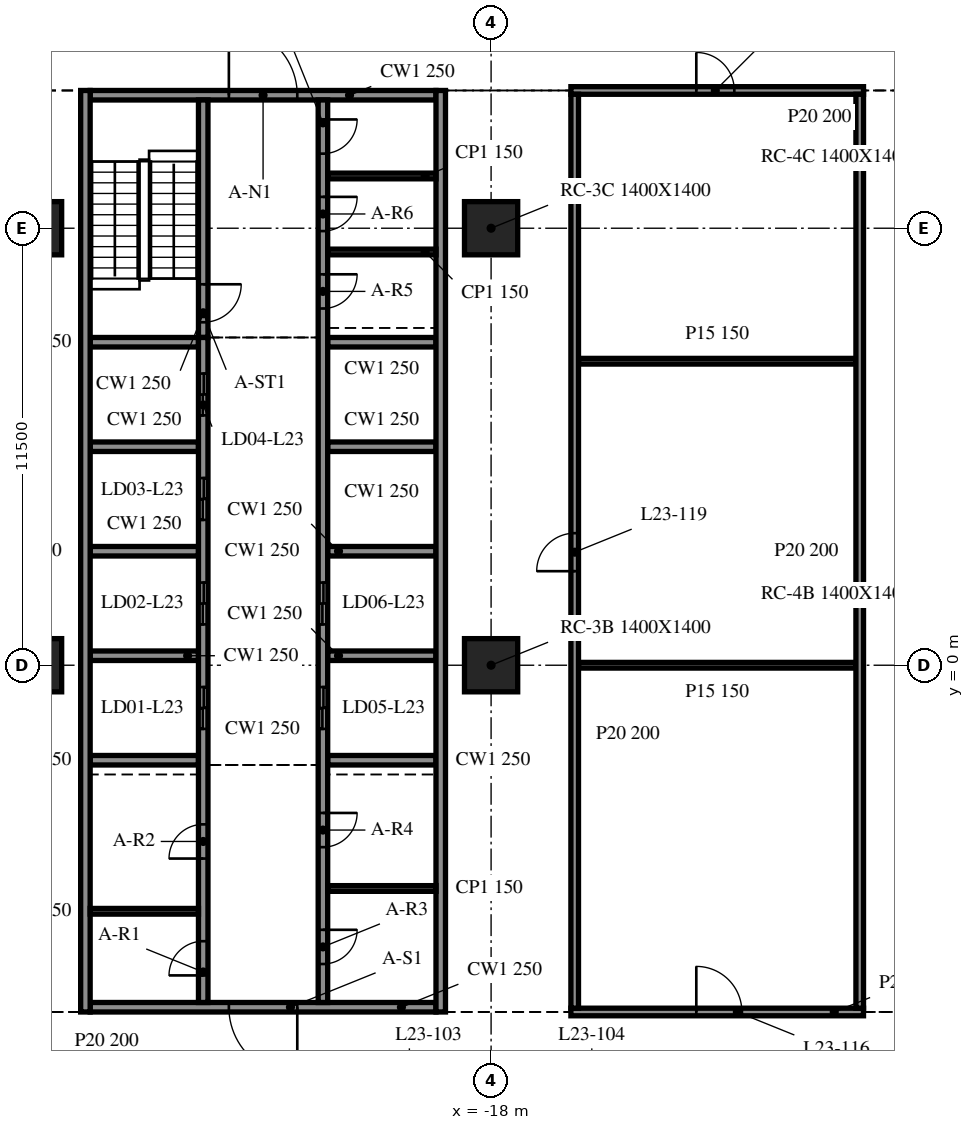
"""IFC4 building model, lengths in metres.
Left out: names, types, materials, properties, quantities, classifications, styles, units other than length and angle.
Written with IfcOpenShell. Run it as: python <this file> out.ifc"""

import sys

from ifc_helpers import new_model, si_unit, direction, frame, frame_2d, origin, origin_2d, place, context, subcontext, project, spatial, rectangle, extrude, element, fill, save


model = new_model("IFC4")
c1 = context("Model", 3, precision=1e-05, world=origin(), true_north=direction((0.0, 1.0)))
c2 = subcontext(c1, "Body", "Model", "MODEL_VIEW")
j1 = project(units=[si_unit("LENGTHUNIT", "METRE"), si_unit("PLANEANGLEUNIT", "RADIAN")], contexts=[c1])
p1 = place(None, origin())
s1 = spatial("IfcSite", under=j1, at=p1, CompositionType="ELEMENT")
p2 = place(p1, origin())
s2 = spatial("IfcBuilding", under=s1, at=p2, CompositionType="ELEMENT")
p3 = place(p2, frame((0.0, 0.0, 101.2)))
s3 = spatial("IfcBuildingStorey", under=s2, at=p3, CompositionType="ELEMENT", Elevation=101.2)
for number, where, z_axis, x_axis in (
    (1, (-30.0, 0.0, -0.34), (0.0, 0.0, 1.0), (1.0, 0.0, 0.0)),
    (2, (-30.0, 11.5, -0.34), (0.0, 0.0, 1.0), (1.0, 0.0, 0.0)),
    (3, (-18.0, 0.0, -0.34), (0.0, 0.0, 1.0), (1.0, 0.0, 0.0)),
    (4, (-18.0, 11.5, -0.34), (0.0, 0.0, 1.0), (1.0, 0.0, 0.0)),
):
    element("IfcColumn", number, at=place(p3, frame(where, z_axis=z_axis, x_axis=x_axis)), inside=s3, PredefinedType="COLUMN", context=c2, shape_type="SweptSolid", body=[
        extrude(rectangle(XDim=1.4, YDim=1.4, at=origin_2d()), origin(), (0.0, 0.0, 1.0), 4.1),
    ])
for number, where, z_axis, x_axis in (
    (5, (-28.675, 15.125, 0.0), (0.0, 0.0, 1.0), (0.0, -1.0, 0.0)),
    (6, (-19.325, -9.125, 0.0), (0.0, 0.0, 1.0), (0.0, 1.0, 0.0)),
):
    element("IfcWall", number, at=place(p3, frame(where, z_axis=z_axis, x_axis=x_axis)), inside=s3, PredefinedType="SOLIDWALL", context=c2, shape_type="SweptSolid", body=[
        extrude(rectangle(XDim=24.25, YDim=0.25, at=frame_2d((12.125, 0.0))), origin(), (0.0, 0.0, 1.0), 3.76),
    ])
p4 = place(p3, frame((-19.45, -9.0, 0.0), z_axis=(0.0, 0.0, 1.0), x_axis=(-1.0, 0.0, 0.0)))
e7 = element("IfcWall", 7, at=p4, inside=s3, PredefinedType="SOLIDWALL", context=c2, shape_type="SweptSolid", body=[
    extrude(rectangle(XDim=9.1, YDim=0.25, at=frame_2d((4.55, 0.0))), origin(), (0.0, 0.0, 1.0), 3.76),
])
p5 = place(p4, frame((3.65, 0.0, 0.0)))
e8 = element("IfcOpeningElement", 8, at=p5, cuts=e7, PredefinedType="OPENING", context=c2, shape_type="SweptSolid", body=[
    extrude(rectangle(XDim=1.8, YDim=2.1, at=frame_2d((0.9, 1.05))), frame((0.0, 0.135, 0.0), z_axis=(0.0, -1.0, 0.0), x_axis=(1.0, 0.0, 0.0)), (0.0, 0.0, 1.0), 0.27),
])
p6 = place(p3, frame((-28.55, 15.0, 0.0), z_axis=(0.0, 0.0, 1.0), x_axis=(1.0, 0.0, 0.0)))
e9 = element("IfcWall", 9, at=p6, inside=s3, PredefinedType="SOLIDWALL", context=c2, shape_type="SweptSolid", body=[
    extrude(rectangle(XDim=9.1, YDim=0.25, at=frame_2d((4.55, 0.0))), origin(), (0.0, 0.0, 1.0), 3.76),
])
p7 = place(p6, frame((3.65, 0.0, 0.0)))
e10 = element("IfcOpeningElement", 10, at=p7, cuts=e9, PredefinedType="OPENING", context=c2, shape_type="SweptSolid", body=[
    extrude(rectangle(XDim=1.8, YDim=2.1, at=frame_2d((0.9, 1.05))), frame((0.0, 0.135, 0.0), z_axis=(0.0, -1.0, 0.0), x_axis=(1.0, 0.0, 0.0)), (0.0, 0.0, 1.0), 0.27),
])
p8 = place(p3, frame((-25.575, -8.875, 0.0), z_axis=(0.0, 0.0, 1.0), x_axis=(0.0, 1.0, 0.0)))
e11 = element("IfcWall", 11, at=p8, inside=s3, PredefinedType="SOLIDWALL", context=c2, shape_type="SweptSolid", body=[
    extrude(rectangle(XDim=17.5, YDim=0.25, at=frame_2d((8.75, 0.0))), origin(), (0.0, 0.0, 1.0), 3.76),
])
p9 = place(p8, frame((7.2, 0.0, 0.0)))
e12 = element("IfcOpeningElement", 12, at=p9, cuts=e11, PredefinedType="OPENING", context=c2, shape_type="SweptSolid", body=[
    extrude(rectangle(XDim=1.1, YDim=2.1, at=frame_2d((0.55, 1.05))), frame((0.0, 0.135, 0.0), z_axis=(0.0, -1.0, 0.0), x_axis=(1.0, 0.0, 0.0)), (0.0, 0.0, 1.0), 0.27),
])
p10 = place(p8, frame((9.95, 0.0, 0.0)))
e13 = element("IfcOpeningElement", 13, at=p10, cuts=e11, PredefinedType="OPENING", context=c2, shape_type="SweptSolid", body=[
    extrude(rectangle(XDim=1.1, YDim=2.1, at=frame_2d((0.55, 1.05))), frame((0.0, 0.135, 0.0), z_axis=(0.0, -1.0, 0.0), x_axis=(1.0, 0.0, 0.0)), (0.0, 0.0, 1.0), 0.27),
])
p11 = place(p8, frame((12.7, 0.0, 0.0)))
e14 = element("IfcOpeningElement", 14, at=p11, cuts=e11, PredefinedType="OPENING", context=c2, shape_type="SweptSolid", body=[
    extrude(rectangle(XDim=1.1, YDim=2.1, at=frame_2d((0.55, 1.05))), frame((0.0, 0.135, 0.0), z_axis=(0.0, -1.0, 0.0), x_axis=(1.0, 0.0, 0.0)), (0.0, 0.0, 1.0), 0.27),
])
p12 = place(p8, frame((15.45, 0.0, 0.0)))
e15 = element("IfcOpeningElement", 15, at=p12, cuts=e11, PredefinedType="OPENING", context=c2, shape_type="SweptSolid", body=[
    extrude(rectangle(XDim=1.1, YDim=2.1, at=frame_2d((0.55, 1.05))), frame((0.0, 0.135, 0.0), z_axis=(0.0, -1.0, 0.0), x_axis=(1.0, 0.0, 0.0)), (0.0, 0.0, 1.0), 0.27),
])
p13 = place(p8, frame((0.712, 0.0, 0.0)))
e16 = element("IfcOpeningElement", 16, at=p13, cuts=e11, PredefinedType="OPENING", context=c2, shape_type="SweptSolid", body=[
    extrude(rectangle(XDim=0.9, YDim=2.1, at=frame_2d((0.45, 1.05))), frame((0.0, 0.135, 0.0), z_axis=(0.0, -1.0, 0.0), x_axis=(1.0, 0.0, 0.0)), (0.0, 0.0, 1.0), 0.27),
])
p14 = place(p8, frame((3.788, 0.0, 0.0)))
e17 = element("IfcOpeningElement", 17, at=p14, cuts=e11, PredefinedType="OPENING", context=c2, shape_type="SweptSolid", body=[
    extrude(rectangle(XDim=0.9, YDim=2.1, at=frame_2d((0.45, 1.05))), frame((0.0, 0.135, 0.0), z_axis=(0.0, -1.0, 0.0), x_axis=(1.0, 0.0, 0.0)), (0.0, 0.0, 1.0), 0.27),
])
p15 = place(p3, frame((-25.575, 14.875, 0.0), z_axis=(0.0, 0.0, 1.0), x_axis=(0.0, -1.0, 0.0)))
e18 = element("IfcWall", 18, at=p15, inside=s3, PredefinedType="SOLIDWALL", context=c2, shape_type="SweptSolid", body=[
    extrude(rectangle(XDim=6.25, YDim=0.25, at=frame_2d((3.125, 0.0))), origin(), (0.0, 0.0, 1.0), 3.76),
])
p16 = place(p15, frame((4.85, 0.0, 0.0)))
e19 = element("IfcOpeningElement", 19, at=p16, cuts=e18, PredefinedType="OPENING", context=c2, shape_type="SweptSolid", body=[
    extrude(rectangle(XDim=1.0, YDim=2.1, at=frame_2d((0.5, 1.05))), frame((0.0, 0.135, 0.0), z_axis=(0.0, -1.0, 0.0), x_axis=(1.0, 0.0, 0.0)), (0.0, 0.0, 1.0), 0.27),
])
p17 = place(p3, frame((-22.425, 14.875, 0.0), z_axis=(0.0, 0.0, 1.0), x_axis=(0.0, -1.0, 0.0)))
e20 = element("IfcWall", 20, at=p17, inside=s3, PredefinedType="SOLIDWALL", context=c2, shape_type="SweptSolid", body=[
    extrude(rectangle(XDim=23.75, YDim=0.25, at=frame_2d((11.875, 0.0))), origin(), (0.0, 0.0, 1.0), 3.76),
])
p18 = place(p17, frame((15.45, 0.0, 0.0)))
e21 = element("IfcOpeningElement", 21, at=p18, cuts=e20, PredefinedType="OPENING", context=c2, shape_type="SweptSolid", body=[
    extrude(rectangle(XDim=1.1, YDim=2.1, at=frame_2d((0.55, 1.05))), frame((0.0, 0.135, 0.0), z_axis=(0.0, -1.0, 0.0), x_axis=(1.0, 0.0, 0.0)), (0.0, 0.0, 1.0), 0.27),
])
p19 = place(p17, frame((12.7, 0.0, 0.0)))
e22 = element("IfcOpeningElement", 22, at=p19, cuts=e20, PredefinedType="OPENING", context=c2, shape_type="SweptSolid", body=[
    extrude(rectangle(XDim=1.1, YDim=2.1, at=frame_2d((0.55, 1.05))), frame((0.0, 0.135, 0.0), z_axis=(0.0, -1.0, 0.0), x_axis=(1.0, 0.0, 0.0)), (0.0, 0.0, 1.0), 0.27),
])
p20 = place(p17, frame((21.837, 0.0, 0.0)))
e23 = element("IfcOpeningElement", 23, at=p20, cuts=e20, PredefinedType="OPENING", context=c2, shape_type="SweptSolid", body=[
    extrude(rectangle(XDim=0.9, YDim=2.1, at=frame_2d((0.45, 1.05))), frame((0.0, 0.135, 0.0), z_axis=(0.0, -1.0, 0.0), x_axis=(1.0, 0.0, 0.0)), (0.0, 0.0, 1.0), 0.27),
])
p21 = place(p17, frame((18.762, 0.0, 0.0)))
e24 = element("IfcOpeningElement", 24, at=p21, cuts=e20, PredefinedType="OPENING", context=c2, shape_type="SweptSolid", body=[
    extrude(rectangle(XDim=0.9, YDim=2.1, at=frame_2d((0.45, 1.05))), frame((0.0, 0.135, 0.0), z_axis=(0.0, -1.0, 0.0), x_axis=(1.0, 0.0, 0.0)), (0.0, 0.0, 1.0), 0.27),
])
p22 = place(p17, frame((4.587, 0.0, 0.0)))
e25 = element("IfcOpeningElement", 25, at=p22, cuts=e20, PredefinedType="OPENING", context=c2, shape_type="SweptSolid", body=[
    extrude(rectangle(XDim=0.9, YDim=2.1, at=frame_2d((0.45, 1.05))), frame((0.0, 0.135, 0.0), z_axis=(0.0, -1.0, 0.0), x_axis=(1.0, 0.0, 0.0)), (0.0, 0.0, 1.0), 0.27),
])
p23 = place(p17, frame((2.55, 0.0, 0.0)))
e26 = element("IfcOpeningElement", 26, at=p23, cuts=e20, PredefinedType="OPENING", context=c2, shape_type="SweptSolid", body=[
    extrude(rectangle(XDim=0.9, YDim=2.1, at=frame_2d((0.45, 1.05))), frame((0.0, 0.135, 0.0), z_axis=(0.0, -1.0, 0.0), x_axis=(1.0, 0.0, 0.0)), (0.0, 0.0, 1.0), 0.27),
])
p24 = place(p17, frame((0.512, 0.0, 0.0)))
e27 = element("IfcOpeningElement", 27, at=p24, cuts=e20, PredefinedType="OPENING", context=c2, shape_type="SweptSolid", body=[
    extrude(rectangle(XDim=0.9, YDim=2.1, at=frame_2d((0.45, 1.05))), frame((0.0, 0.135, 0.0), z_axis=(0.0, -1.0, 0.0), x_axis=(1.0, 0.0, 0.0)), (0.0, 0.0, 1.0), 0.27),
])
for number, where, z_axis, x_axis in (
    (28, (-28.55, -2.5, 0.0), (0.0, 0.0, 1.0), (1.0, 0.0, 0.0)),
    (29, (-28.55, 0.25, 0.0), (0.0, 0.0, 1.0), (1.0, 0.0, 0.0)),
    (30, (-28.55, 3.0, 0.0), (0.0, 0.0, 1.0), (1.0, 0.0, 0.0)),
    (31, (-28.55, 5.75, 0.0), (0.0, 0.0, 1.0), (1.0, 0.0, 0.0)),
    (32, (-28.55, 8.5, 0.0), (0.0, 0.0, 1.0), (1.0, 0.0, 0.0)),
    (33, (-22.3, -2.5, 0.0), (0.0, 0.0, 1.0), (1.0, 0.0, 0.0)),
    (34, (-22.3, 0.25, 0.0), (0.0, 0.0, 1.0), (1.0, 0.0, 0.0)),
    (35, (-22.3, 3.0, 0.0), (0.0, 0.0, 1.0), (1.0, 0.0, 0.0)),
    (36, (-22.3, 5.75, 0.0), (0.0, 0.0, 1.0), (1.0, 0.0, 0.0)),
    (37, (-22.3, 8.5, 0.0), (0.0, 0.0, 1.0), (1.0, 0.0, 0.0)),
):
    element("IfcWall", number, at=place(p3, frame(where, z_axis=z_axis, x_axis=x_axis)), inside=s3, PredefinedType="SOLIDWALL", context=c2, shape_type="SweptSolid", body=[
        extrude(rectangle(XDim=2.85, YDim=0.25, at=frame_2d((1.425, 0.0))), origin(), (0.0, 0.0, 1.0), 3.76),
    ])
for number, where, z_axis, x_axis in (
    (38, (-28.55, -6.475, 0.0), (0.0, 0.0, 1.0), (1.0, 0.0, 0.0)),
    (39, (-22.3, -5.875, 0.0), (0.0, 0.0, 1.0), (1.0, 0.0, 0.0)),
    (40, (-22.3, 10.875, 0.0), (0.0, 0.0, 1.0), (1.0, 0.0, 0.0)),
    (41, (-22.3, 12.875, 0.0), (0.0, 0.0, 1.0), (1.0, 0.0, 0.0)),
):
    element("IfcWall", number, at=place(p3, frame(where, z_axis=z_axis, x_axis=x_axis)), inside=s3, PredefinedType="PARTITIONING", context=c2, shape_type="SweptSolid", body=[
        extrude(rectangle(XDim=2.85, YDim=0.15, at=frame_2d((1.425, 0.0))), origin(), (0.0, 0.0, 1.0), 3.76),
    ])
p25 = place(p3, frame((-15.9, -9.125, 0.0), z_axis=(0.0, 0.0, 1.0), x_axis=(1.0, 0.0, 0.0)))
e42 = element("IfcWall", 42, at=p25, inside=s3, PredefinedType="PARTITIONING", context=c2, shape_type="SweptSolid", body=[
    extrude(rectangle(XDim=7.7, YDim=0.2, at=frame_2d((3.85, 0.0))), origin(), (0.0, 0.0, 1.0), 3.76),
])
p26 = place(p25, frame((3.3, 0.0, 0.0)))
e43 = element("IfcOpeningElement", 43, at=p26, cuts=e42, PredefinedType="OPENING", context=c2, shape_type="SweptSolid", body=[
    extrude(rectangle(XDim=1.2, YDim=2.1, at=frame_2d((0.6, 1.05))), frame((0.0, 0.11, 0.0), z_axis=(0.0, -1.0, 0.0), x_axis=(1.0, 0.0, 0.0)), (0.0, 0.0, 1.0), 0.22),
])
for number, where, z_axis, x_axis in (
    (44, (-15.7, 0.0, 0.0), (0.0, 0.0, 1.0), (1.0, 0.0, 0.0)),
    (45, (-15.7, 8.0, 0.0), (0.0, 0.0, 1.0), (1.0, 0.0, 0.0)),
):
    element("IfcWall", number, at=place(p3, frame(where, z_axis=z_axis, x_axis=x_axis)), inside=s3, PredefinedType="PARTITIONING", context=c2, shape_type="SweptSolid", body=[
        extrude(rectangle(XDim=7.3, YDim=0.15, at=frame_2d((3.65, 0.0))), origin(), (0.0, 0.0, 1.0), 3.76),
    ])
p27 = place(p3, frame((-15.9, 15.125, 0.0), z_axis=(0.0, 0.0, 1.0), x_axis=(1.0, 0.0, 0.0)))
e46 = element("IfcWall", 46, at=p27, inside=s3, PredefinedType="PARTITIONING", context=c2, shape_type="SweptSolid", body=[
    extrude(rectangle(XDim=7.7, YDim=0.2, at=frame_2d((3.85, 0.0))), origin(), (0.0, 0.0, 1.0), 3.76),
])
p28 = place(p27, frame((3.3, 0.0, 0.0)))
e47 = element("IfcOpeningElement", 47, at=p28, cuts=e46, PredefinedType="OPENING", context=c2, shape_type="SweptSolid", body=[
    extrude(rectangle(XDim=1.0, YDim=2.1, at=frame_2d((0.5, 1.05))), frame((0.0, 0.11, 0.0), z_axis=(0.0, -1.0, 0.0), x_axis=(1.0, 0.0, 0.0)), (0.0, 0.0, 1.0), 0.22),
])
p29 = place(p3, frame((-15.8, -9.025, 0.0), z_axis=(0.0, 0.0, 1.0), x_axis=(0.0, 1.0, 0.0)))
e48 = element("IfcWall", 48, at=p29, inside=s3, PredefinedType="PARTITIONING", context=c2, shape_type="SweptSolid", body=[
    extrude(rectangle(XDim=24.05, YDim=0.2, at=frame_2d((12.025, 0.0))), origin(), (0.0, 0.0, 1.0), 3.76),
])
p30 = place(p29, frame((11.5, 0.0, 0.0)))
e49 = element("IfcOpeningElement", 49, at=p30, cuts=e48, PredefinedType="OPENING", context=c2, shape_type="SweptSolid", body=[
    extrude(rectangle(XDim=1.0, YDim=2.1, at=frame_2d((0.5, 1.05))), frame((0.0, 0.11, 0.0), z_axis=(0.0, -1.0, 0.0), x_axis=(1.0, 0.0, 0.0)), (0.0, 0.0, 1.0), 0.22),
])
p31 = place(p3, frame((-8.3, -9.025, 0.0), z_axis=(0.0, 0.0, 1.0), x_axis=(0.0, 1.0, 0.0)))
e50 = element("IfcWall", 50, at=p31, inside=s3, PredefinedType="PARTITIONING", context=c2, shape_type="SweptSolid", body=[
    extrude(rectangle(XDim=24.05, YDim=0.2, at=frame_2d((12.025, 0.0))), origin(), (0.0, 0.0, 1.0), 3.76),
])
p32 = place(p5, origin())
e51 = element("IfcDoor", 51, at=p32, inside=s3, OperationType="DOUBLE_DOOR_SINGLE_SWING", PredefinedType="DOOR", context=c2, shape_type="SweptSolid", body=[
    extrude(rectangle(XDim=1.8, YDim=2.1, at=frame_2d((0.9, 1.05))), frame((0.0, 0.025, 0.0), z_axis=(0.0, -1.0, 0.0), x_axis=(1.0, 0.0, 0.0)), (0.0, 0.0, 1.0), 0.05),
])
fill(e8, e51)
p33 = place(p7, origin())
e52 = element("IfcDoor", 52, at=p33, inside=s3, OperationType="DOUBLE_DOOR_SINGLE_SWING", PredefinedType="DOOR", context=c2, shape_type="SweptSolid", body=[
    extrude(rectangle(XDim=1.8, YDim=2.1, at=frame_2d((0.9, 1.05))), frame((0.0, 0.025, 0.0), z_axis=(0.0, -1.0, 0.0), x_axis=(1.0, 0.0, 0.0)), (0.0, 0.0, 1.0), 0.05),
])
fill(e10, e52)
p34 = place(p18, origin())
e53 = element("IfcDoor", 53, at=p34, inside=s3, OperationType="DOUBLE_DOOR_SLIDING", PredefinedType="DOOR", context=c2, shape_type="SweptSolid", body=[
    extrude(rectangle(XDim=1.1, YDim=2.1, at=frame_2d((0.55, 1.05))), frame((0.0, 0.025, 0.0), z_axis=(0.0, -1.0, 0.0), x_axis=(1.0, 0.0, 0.0)), (0.0, 0.0, 1.0), 0.05),
])
fill(e21, e53)
p35 = place(p19, origin())
e54 = element("IfcDoor", 54, at=p35, inside=s3, OperationType="DOUBLE_DOOR_SLIDING", PredefinedType="DOOR", context=c2, shape_type="SweptSolid", body=[
    extrude(rectangle(XDim=1.1, YDim=2.1, at=frame_2d((0.55, 1.05))), frame((0.0, 0.025, 0.0), z_axis=(0.0, -1.0, 0.0), x_axis=(1.0, 0.0, 0.0)), (0.0, 0.0, 1.0), 0.05),
])
fill(e22, e54)
p36 = place(p9, origin())
e55 = element("IfcDoor", 55, at=p36, inside=s3, OperationType="DOUBLE_DOOR_SLIDING", PredefinedType="DOOR", context=c2, shape_type="SweptSolid", body=[
    extrude(rectangle(XDim=1.1, YDim=2.1, at=frame_2d((0.55, 1.05))), frame((0.0, 0.025, 0.0), z_axis=(0.0, -1.0, 0.0), x_axis=(1.0, 0.0, 0.0)), (0.0, 0.0, 1.0), 0.05),
])
fill(e12, e55)
p37 = place(p10, origin())
e56 = element("IfcDoor", 56, at=p37, inside=s3, OperationType="DOUBLE_DOOR_SLIDING", PredefinedType="DOOR", context=c2, shape_type="SweptSolid", body=[
    extrude(rectangle(XDim=1.1, YDim=2.1, at=frame_2d((0.55, 1.05))), frame((0.0, 0.025, 0.0), z_axis=(0.0, -1.0, 0.0), x_axis=(1.0, 0.0, 0.0)), (0.0, 0.0, 1.0), 0.05),
])
fill(e13, e56)
p38 = place(p11, origin())
e57 = element("IfcDoor", 57, at=p38, inside=s3, OperationType="DOUBLE_DOOR_SLIDING", PredefinedType="DOOR", context=c2, shape_type="SweptSolid", body=[
    extrude(rectangle(XDim=1.1, YDim=2.1, at=frame_2d((0.55, 1.05))), frame((0.0, 0.025, 0.0), z_axis=(0.0, -1.0, 0.0), x_axis=(1.0, 0.0, 0.0)), (0.0, 0.0, 1.0), 0.05),
])
fill(e14, e57)
p39 = place(p12, origin())
e58 = element("IfcDoor", 58, at=p39, inside=s3, OperationType="DOUBLE_DOOR_SLIDING", PredefinedType="DOOR", context=c2, shape_type="SweptSolid", body=[
    extrude(rectangle(XDim=1.1, YDim=2.1, at=frame_2d((0.55, 1.05))), frame((0.0, 0.025, 0.0), z_axis=(0.0, -1.0, 0.0), x_axis=(1.0, 0.0, 0.0)), (0.0, 0.0, 1.0), 0.05),
])
fill(e15, e58)
p40 = place(p13, origin())
e59 = element("IfcDoor", 59, at=p40, inside=s3, OperationType="SINGLE_SWING_LEFT", PredefinedType="DOOR", context=c2, shape_type="SweptSolid", body=[
    extrude(rectangle(XDim=0.9, YDim=2.1, at=frame_2d((0.45, 1.05))), frame((0.0, 0.025, 0.0), z_axis=(0.0, -1.0, 0.0), x_axis=(1.0, 0.0, 0.0)), (0.0, 0.0, 1.0), 0.05),
])
fill(e16, e59)
p41 = place(p14, origin())
e60 = element("IfcDoor", 60, at=p41, inside=s3, OperationType="SINGLE_SWING_RIGHT", PredefinedType="DOOR", context=c2, shape_type="SweptSolid", body=[
    extrude(rectangle(XDim=0.9, YDim=2.1, at=frame_2d((0.45, 1.05))), frame((0.0, 0.025, 0.0), z_axis=(0.0, -1.0, 0.0), x_axis=(1.0, 0.0, 0.0)), (0.0, 0.0, 1.0), 0.05),
])
fill(e17, e60)
p42 = place(p20, origin())
e61 = element("IfcDoor", 61, at=p42, inside=s3, OperationType="SINGLE_SWING_LEFT", PredefinedType="DOOR", context=c2, shape_type="SweptSolid", body=[
    extrude(rectangle(XDim=0.9, YDim=2.1, at=frame_2d((0.45, 1.05))), frame((0.0, 0.025, 0.0), z_axis=(0.0, -1.0, 0.0), x_axis=(1.0, 0.0, 0.0)), (0.0, 0.0, 1.0), 0.05),
])
fill(e23, e61)
p43 = place(p21, origin())
e62 = element("IfcDoor", 62, at=p43, inside=s3, OperationType="SINGLE_SWING_RIGHT", PredefinedType="DOOR", context=c2, shape_type="SweptSolid", body=[
    extrude(rectangle(XDim=0.9, YDim=2.1, at=frame_2d((0.45, 1.05))), frame((0.0, 0.025, 0.0), z_axis=(0.0, -1.0, 0.0), x_axis=(1.0, 0.0, 0.0)), (0.0, 0.0, 1.0), 0.05),
])
fill(e24, e62)
p44 = place(p22, origin())
e63 = element("IfcDoor", 63, at=p44, inside=s3, OperationType="SINGLE_SWING_LEFT", PredefinedType="DOOR", context=c2, shape_type="SweptSolid", body=[
    extrude(rectangle(XDim=0.9, YDim=2.1, at=frame_2d((0.45, 1.05))), frame((0.0, 0.025, 0.0), z_axis=(0.0, -1.0, 0.0), x_axis=(1.0, 0.0, 0.0)), (0.0, 0.0, 1.0), 0.05),
])
fill(e25, e63)
p45 = place(p23, origin())
e64 = element("IfcDoor", 64, at=p45, inside=s3, OperationType="SINGLE_SWING_RIGHT", PredefinedType="DOOR", context=c2, shape_type="SweptSolid", body=[
    extrude(rectangle(XDim=0.9, YDim=2.1, at=frame_2d((0.45, 1.05))), frame((0.0, 0.025, 0.0), z_axis=(0.0, -1.0, 0.0), x_axis=(1.0, 0.0, 0.0)), (0.0, 0.0, 1.0), 0.05),
])
fill(e26, e64)
p46 = place(p24, origin())
e65 = element("IfcDoor", 65, at=p46, inside=s3, OperationType="SINGLE_SWING_LEFT", PredefinedType="DOOR", context=c2, shape_type="SweptSolid", body=[
    extrude(rectangle(XDim=0.9, YDim=2.1, at=frame_2d((0.45, 1.05))), frame((0.0, 0.025, 0.0), z_axis=(0.0, -1.0, 0.0), x_axis=(1.0, 0.0, 0.0)), (0.0, 0.0, 1.0), 0.05),
])
fill(e27, e65)
p47 = place(p16, origin())
e66 = element("IfcDoor", 66, at=p47, inside=s3, OperationType="SINGLE_SWING_RIGHT", PredefinedType="DOOR", context=c2, shape_type="SweptSolid", body=[
    extrude(rectangle(XDim=1.0, YDim=2.1, at=frame_2d((0.5, 1.05))), frame((0.0, 0.025, 0.0), z_axis=(0.0, -1.0, 0.0), x_axis=(1.0, 0.0, 0.0)), (0.0, 0.0, 1.0), 0.05),
])
fill(e19, e66)
p48 = place(p26, origin())
e67 = element("IfcDoor", 67, at=p48, inside=s3, OperationType="SINGLE_SWING_RIGHT", PredefinedType="DOOR", context=c2, shape_type="SweptSolid", body=[
    extrude(rectangle(XDim=1.2, YDim=2.1, at=frame_2d((0.6, 1.05))), frame((0.0, 0.025, 0.0), z_axis=(0.0, -1.0, 0.0), x_axis=(1.0, 0.0, 0.0)), (0.0, 0.0, 1.0), 0.05),
])
fill(e43, e67)
p49 = place(p30, origin())
e68 = element("IfcDoor", 68, at=p49, inside=s3, OperationType="SINGLE_SWING_RIGHT", PredefinedType="DOOR", context=c2, shape_type="SweptSolid", body=[
    extrude(rectangle(XDim=1.0, YDim=2.1, at=frame_2d((0.5, 1.05))), frame((0.0, 0.025, 0.0), z_axis=(0.0, -1.0, 0.0), x_axis=(1.0, 0.0, 0.0)), (0.0, 0.0, 1.0), 0.05),
])
fill(e49, e68)
p50 = place(p28, origin())
e69 = element("IfcDoor", 69, at=p50, inside=s3, OperationType="SINGLE_SWING_RIGHT", PredefinedType="DOOR", context=c2, shape_type="SweptSolid", body=[
    extrude(rectangle(XDim=1.0, YDim=2.1, at=frame_2d((0.5, 1.05))), frame((0.0, 0.025, 0.0), z_axis=(0.0, -1.0, 0.0), x_axis=(1.0, 0.0, 0.0)), (0.0, 0.0, 1.0), 0.05),
])
fill(e47, e69)
save(model, sys.argv[1])
